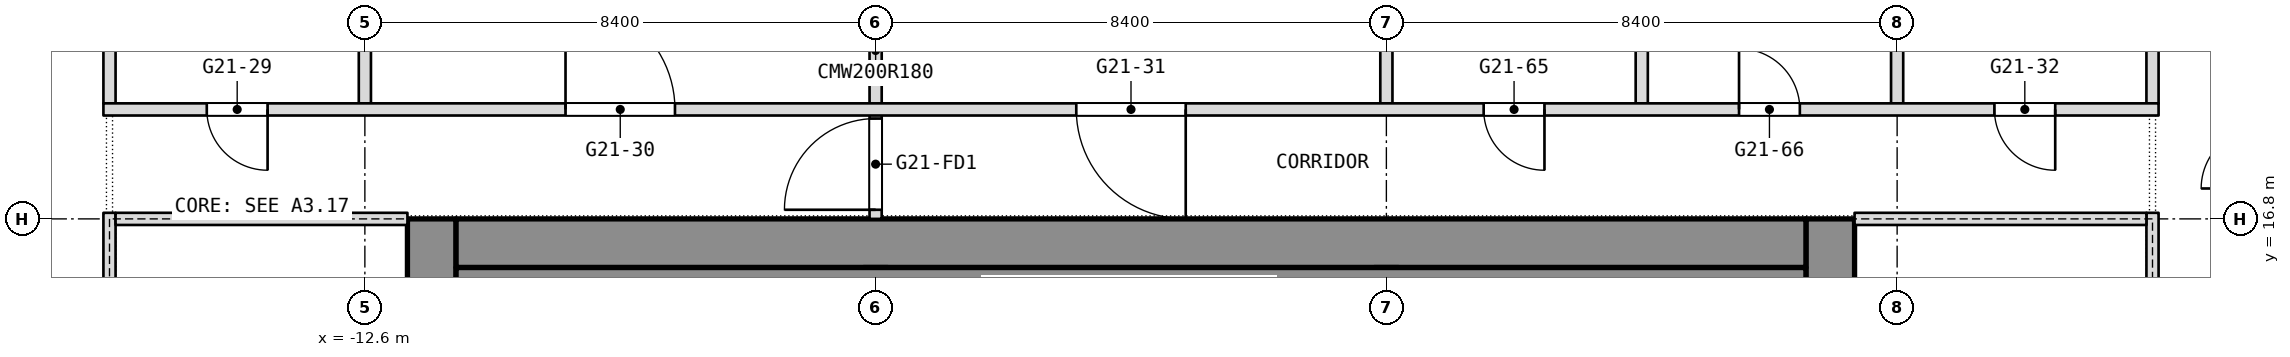
"""IFC4 building model, lengths in metres.
Left out: names, types, materials, properties, quantities, classifications, styles, units other than length and angle.
Written with IfcOpenShell. Run it as: python <this file> out.ifc"""

import sys

from ifc_helpers import new_model, si_unit, direction, frame, frame_2d, origin, place, context, subcontext, project, spatial, rectangle, extrude, element, fill, save


model = new_model("IFC4")
c1 = context("Model", 3, precision=1e-05, world=origin(), true_north=direction((0.0, 1.0)))
c2 = subcontext(c1, "Body", "Model", "MODEL_VIEW")
j1 = project(units=[si_unit("LENGTHUNIT", "METRE"), si_unit("PLANEANGLEUNIT", "RADIAN")], contexts=[c1])
p1 = place(None, origin())
s1 = spatial("IfcSite", under=j1, at=p1, CompositionType="ELEMENT")
p2 = place(p1, origin())
s2 = spatial("IfcBuilding", under=s1, at=p2, CompositionType="ELEMENT")
p3 = place(p2, frame((0.0, 0.0, 241.7)))
s3 = spatial("IfcBuildingStorey", under=s2, at=p3, CompositionType="ELEMENT", Elevation=241.7)
p4 = place(p3, frame((11.5, 0.0, 0.0), z_axis=(0.0, 0.0, 1.0), x_axis=(0.0, 1.0, 0.0)))
e1 = element("IfcWall", 1, at=p4, inside=s3, PredefinedType="SHEAR", context=c2, shape_type="SweptSolid", body=[
    extrude(rectangle(XDim=16.8, YDim=0.8, at=frame_2d((8.4, 0.0))), origin(), (0.0, 0.0, 1.0), 3.6),
])
p5 = place(p4, frame((2.3, 0.0, 0.0)))
e2 = element("IfcOpeningElement", 2, at=p5, cuts=e1, PredefinedType="OPENING", context=c2, shape_type="SweptSolid", body=[
    extrude(rectangle(XDim=1.1, YDim=2.1, at=frame_2d((0.55, 1.05))), frame((0.0, 0.4, 0.0), z_axis=(0.0, -1.0, 0.0), x_axis=(1.0, 0.0, 0.0)), (0.0, 0.0, 1.0), 0.8),
])
p6 = place(p4, frame((4.85, 0.0, 0.0)))
e3 = element("IfcOpeningElement", 3, at=p6, cuts=e1, PredefinedType="OPENING", context=c2, shape_type="SweptSolid", body=[
    extrude(rectangle(XDim=1.1, YDim=2.1, at=frame_2d((0.55, 1.05))), frame((0.0, 0.4, 0.0), z_axis=(0.0, -1.0, 0.0), x_axis=(1.0, 0.0, 0.0)), (0.0, 0.0, 1.0), 0.8),
])
p7 = place(p4, frame((6.825, 0.0, 0.0)))
e4 = element("IfcOpeningElement", 4, at=p7, cuts=e1, PredefinedType="OPENING", context=c2, shape_type="SweptSolid", body=[
    extrude(rectangle(XDim=1.2, YDim=2.1, at=frame_2d((0.6, 1.05))), frame((0.0, 0.4, 0.0), z_axis=(0.0, -1.0, 0.0), x_axis=(1.0, 0.0, 0.0)), (0.0, 0.0, 1.0), 0.8),
])
p8 = place(p4, frame((13.4, 0.0, 0.0)))
e5 = element("IfcOpeningElement", 5, at=p8, cuts=e1, PredefinedType="OPENING", context=c2, shape_type="SweptSolid", body=[
    extrude(rectangle(XDim=1.1, YDim=2.1, at=frame_2d((0.55, 1.05))), frame((0.0, 0.4, 0.0), z_axis=(0.0, -1.0, 0.0), x_axis=(1.0, 0.0, 0.0)), (0.0, 0.0, 1.0), 0.8),
])
p9 = place(p4, frame((10.85, 0.0, 0.0)))
e6 = element("IfcOpeningElement", 6, at=p9, cuts=e1, PredefinedType="OPENING", context=c2, shape_type="SweptSolid", body=[
    extrude(rectangle(XDim=1.1, YDim=2.1, at=frame_2d((0.55, 1.05))), frame((0.0, 0.4, 0.0), z_axis=(0.0, -1.0, 0.0), x_axis=(1.0, 0.0, 0.0)), (0.0, 0.0, 1.0), 0.8),
])
p10 = place(p4, frame((8.775, 0.0, 0.0)))
e7 = element("IfcOpeningElement", 7, at=p10, cuts=e1, PredefinedType="OPENING", context=c2, shape_type="SweptSolid", body=[
    extrude(rectangle(XDim=1.2, YDim=2.1, at=frame_2d((0.6, 1.05))), frame((0.0, 0.4, 0.0), z_axis=(0.0, -1.0, 0.0), x_axis=(1.0, 0.0, 0.0)), (0.0, 0.0, 1.0), 0.8),
])
p11 = place(p3, frame((-11.5, 0.0, 0.0), z_axis=(0.0, 0.0, 1.0), x_axis=(0.0, 1.0, 0.0)))
e8 = element("IfcWall", 8, at=p11, inside=s3, PredefinedType="SHEAR", context=c2, shape_type="SweptSolid", body=[
    extrude(rectangle(XDim=16.8, YDim=0.8, at=frame_2d((8.4, 0.0))), origin(), (0.0, 0.0, 1.0), 3.6),
])
p12 = place(p11, frame((1.837, 0.0, 0.0)))
e9 = element("IfcOpeningElement", 9, at=p12, cuts=e8, PredefinedType="OPENING", context=c2, shape_type="SweptSolid", body=[
    extrude(rectangle(XDim=0.9, YDim=2.1, at=frame_2d((0.45, 1.05))), frame((0.0, 0.4, 0.0), z_axis=(0.0, -1.0, 0.0), x_axis=(1.0, 0.0, 0.0)), (0.0, 0.0, 1.0), 0.8),
])
p13 = place(p11, frame((4.462, 0.0, 0.0)))
e10 = element("IfcOpeningElement", 10, at=p13, cuts=e8, PredefinedType="OPENING", context=c2, shape_type="SweptSolid", body=[
    extrude(rectangle(XDim=0.9, YDim=2.1, at=frame_2d((0.45, 1.05))), frame((0.0, 0.4, 0.0), z_axis=(0.0, -1.0, 0.0), x_axis=(1.0, 0.0, 0.0)), (0.0, 0.0, 1.0), 0.8),
])
p14 = place(p11, frame((6.825, 0.0, 0.0)))
e11 = element("IfcOpeningElement", 11, at=p14, cuts=e8, PredefinedType="OPENING", context=c2, shape_type="SweptSolid", body=[
    extrude(rectangle(XDim=1.2, YDim=2.1, at=frame_2d((0.6, 1.05))), frame((0.0, 0.4, 0.0), z_axis=(0.0, -1.0, 0.0), x_axis=(1.0, 0.0, 0.0)), (0.0, 0.0, 1.0), 0.8),
])
p15 = place(p11, frame((12.3, 0.0, 0.0)))
e12 = element("IfcOpeningElement", 12, at=p15, cuts=e8, PredefinedType="OPENING", context=c2, shape_type="SweptSolid", body=[
    extrude(rectangle(XDim=0.9, YDim=2.1, at=frame_2d((0.45, 1.05))), frame((0.0, 0.4, 0.0), z_axis=(0.0, -1.0, 0.0), x_axis=(1.0, 0.0, 0.0)), (0.0, 0.0, 1.0), 0.8),
])
p16 = place(p11, frame((8.775, 0.0, 0.0)))
e13 = element("IfcOpeningElement", 13, at=p16, cuts=e8, PredefinedType="OPENING", context=c2, shape_type="SweptSolid", body=[
    extrude(rectangle(XDim=1.2, YDim=2.1, at=frame_2d((0.6, 1.05))), frame((0.0, 0.4, 0.0), z_axis=(0.0, -1.0, 0.0), x_axis=(1.0, 0.0, 0.0)), (0.0, 0.0, 1.0), 0.8),
])
p17 = place(p3, frame((-11.1, 16.4, 0.0), z_axis=(0.0, 0.0, 1.0), x_axis=(1.0, 0.0, 0.0)))
e14 = element("IfcWall", 14, at=p17, inside=s3, PredefinedType="SHEAR", context=c2, shape_type="SweptSolid", body=[
    extrude(rectangle(XDim=22.2, YDim=0.8, at=frame_2d((11.1, 0.0))), origin(), (0.0, 0.0, 1.0), 3.6),
])
p18 = place(p3, frame((-4.2, 0.8, 0.0), z_axis=(0.0, 0.0, 1.0), x_axis=(0.0, 1.0, 0.0)))
e15 = element("IfcWall", 15, at=p18, inside=s3, PredefinedType="SHEAR", context=c2, shape_type="SweptSolid", body=[
    extrude(rectangle(XDim=15.2, YDim=0.4, at=frame_2d((7.6, 0.0))), origin(), (0.0, 0.0, 1.0), 3.6),
])
p19 = place(p18, frame((8.5, 0.0, 0.0)))
e16 = element("IfcOpeningElement", 16, at=p19, cuts=e15, PredefinedType="OPENING", context=c2, shape_type="SweptSolid", body=[
    extrude(rectangle(XDim=1.2, YDim=2.1, at=frame_2d((0.6, 1.05))), frame((0.0, 0.2, 0.0), z_axis=(0.0, -1.0, 0.0), x_axis=(1.0, 0.0, 0.0)), (0.0, 0.0, 1.0), 0.4),
])
p20 = place(p3, frame((4.2, 0.8, 0.0), z_axis=(0.0, 0.0, 1.0), x_axis=(0.0, 1.0, 0.0)))
e17 = element("IfcWall", 17, at=p20, inside=s3, PredefinedType="SHEAR", context=c2, shape_type="SweptSolid", body=[
    extrude(rectangle(XDim=15.2, YDim=0.4, at=frame_2d((7.6, 0.0))), origin(), (0.0, 0.0, 1.0), 3.6),
])
p21 = place(p20, frame((5.95, 0.0, 0.0)))
e18 = element("IfcOpeningElement", 18, at=p21, cuts=e17, PredefinedType="OPENING", context=c2, shape_type="SweptSolid", body=[
    extrude(rectangle(XDim=1.2, YDim=2.1, at=frame_2d((0.6, 1.05))), frame((0.0, 0.2, 0.0), z_axis=(0.0, -1.0, 0.0), x_axis=(1.0, 0.0, 0.0)), (0.0, 0.0, 1.0), 0.4),
])
for number, where, z_axis, x_axis in (
    (19, (16.8, 18.7, 0.0), (0.0, 0.0, 1.0), (0.0, 1.0, 0.0)),
    (20, (12.6, 18.7, 0.0), (0.0, 0.0, 1.0), (0.0, 1.0, 0.0)),
    (21, (8.4, 18.7, 0.0), (0.0, 0.0, 1.0), (0.0, 1.0, 0.0)),
    (22, (4.2, 18.7, 0.0), (0.0, 0.0, 1.0), (0.0, 1.0, 0.0)),
):
    element("IfcWall", number, at=place(p3, frame(where, z_axis=z_axis, x_axis=x_axis)), inside=s3, PredefinedType="PARTITIONING", context=c2, shape_type="SweptSolid", body=[
        extrude(rectangle(XDim=3.64, YDim=0.2, at=frame_2d((1.82, 0.0))), origin(), (0.0, 0.0, 1.0), 3.34),
    ])
p22 = place(p3, frame((-4.2, 16.8, 0.0), z_axis=(0.0, 0.0, 1.0), x_axis=(0.0, 1.0, 0.0)))
e23 = element("IfcWall", 23, at=p22, inside=s3, PredefinedType="PARTITIONING", context=c2, shape_type="SweptSolid", body=[
    extrude(rectangle(XDim=5.54, YDim=0.2, at=frame_2d((2.77, 0.0))), origin(), (0.0, 0.0, 1.0), 3.34),
])
p23 = place(p22, frame((0.15, 0.0, 0.0)))
e24 = element("IfcOpeningElement", 24, at=p23, cuts=e23, PredefinedType="OPENING", context=c2, shape_type="SweptSolid", body=[
    extrude(rectangle(XDim=1.5, YDim=2.1, at=frame_2d((0.75, 1.05))), frame((0.0, 0.1, 0.0), z_axis=(0.0, -1.0, 0.0), x_axis=(1.0, 0.0, 0.0)), (0.0, 0.0, 1.0), 0.2),
])
for number, where, z_axis, x_axis in (
    (25, (-12.6, 18.7, 0.0), (0.0, 0.0, 1.0), (0.0, 1.0, 0.0)),
    (26, (-16.8, 18.7, 0.0), (0.0, 0.0, 1.0), (0.0, 1.0, 0.0)),
):
    element("IfcWall", number, at=place(p3, frame(where, z_axis=z_axis, x_axis=x_axis)), inside=s3, PredefinedType="PARTITIONING", context=c2, shape_type="SweptSolid", body=[
        extrude(rectangle(XDim=3.64, YDim=0.2, at=frame_2d((1.82, 0.0))), origin(), (0.0, 0.0, 1.0), 3.34),
    ])
p24 = place(p3, frame((-16.9, 18.6, 0.0), z_axis=(0.0, 0.0, 1.0), x_axis=(1.0, 0.0, 0.0)))
e27 = element("IfcWall", 27, at=p24, inside=s3, PredefinedType="PARTITIONING", context=c2, shape_type="SweptSolid", body=[
    extrude(rectangle(XDim=33.8, YDim=0.2, at=frame_2d((16.9, 0.0))), origin(), (0.0, 0.0, 1.0), 3.34),
])
p25 = place(p24, frame((1.7, 0.0, 0.0)))
e28 = element("IfcOpeningElement", 28, at=p25, cuts=e27, PredefinedType="OPENING", context=c2, shape_type="SweptSolid", body=[
    extrude(rectangle(XDim=1.0, YDim=2.1, at=frame_2d((0.5, 1.05))), frame((0.0, 0.1, 0.0), z_axis=(0.0, -1.0, 0.0), x_axis=(1.0, 0.0, 0.0)), (0.0, 0.0, 1.0), 0.2),
])
p26 = place(p24, frame((7.6, 0.0, 0.0)))
e29 = element("IfcOpeningElement", 29, at=p26, cuts=e27, PredefinedType="OPENING", context=c2, shape_type="SweptSolid", body=[
    extrude(rectangle(XDim=1.8, YDim=2.1, at=frame_2d((0.9, 1.05))), frame((0.0, 0.1, 0.0), z_axis=(0.0, -1.0, 0.0), x_axis=(1.0, 0.0, 0.0)), (0.0, 0.0, 1.0), 0.2),
])
p27 = place(p24, frame((16.0, 0.0, 0.0)))
e30 = element("IfcOpeningElement", 30, at=p27, cuts=e27, PredefinedType="OPENING", context=c2, shape_type="SweptSolid", body=[
    extrude(rectangle(XDim=1.8, YDim=2.1, at=frame_2d((0.9, 1.05))), frame((0.0, 0.1, 0.0), z_axis=(0.0, -1.0, 0.0), x_axis=(1.0, 0.0, 0.0)), (0.0, 0.0, 1.0), 0.2),
])
p28 = place(p24, frame((31.1, 0.0, 0.0)))
e31 = element("IfcOpeningElement", 31, at=p28, cuts=e27, PredefinedType="OPENING", context=c2, shape_type="SweptSolid", body=[
    extrude(rectangle(XDim=1.0, YDim=2.1, at=frame_2d((0.5, 1.05))), frame((0.0, 0.1, 0.0), z_axis=(0.0, -1.0, 0.0), x_axis=(1.0, 0.0, 0.0)), (0.0, 0.0, 1.0), 0.2),
])
p29 = place(p24, frame((22.7, 0.0, 0.0)))
e32 = element("IfcOpeningElement", 32, at=p29, cuts=e27, PredefinedType="OPENING", context=c2, shape_type="SweptSolid", body=[
    extrude(rectangle(XDim=1.0, YDim=2.1, at=frame_2d((0.5, 1.05))), frame((0.0, 0.1, 0.0), z_axis=(0.0, -1.0, 0.0), x_axis=(1.0, 0.0, 0.0)), (0.0, 0.0, 1.0), 0.2),
])
p30 = place(p24, frame((26.9, 0.0, 0.0)))
e33 = element("IfcOpeningElement", 33, at=p30, cuts=e27, PredefinedType="OPENING", context=c2, shape_type="SweptSolid", body=[
    extrude(rectangle(XDim=1.0, YDim=2.1, at=frame_2d((0.5, 1.05))), frame((0.0, 0.1, 0.0), z_axis=(0.0, -1.0, 0.0), x_axis=(1.0, 0.0, 0.0)), (0.0, 0.0, 1.0), 0.2),
])
p31 = place(p3, frame((-11.1, 15.65, 0.0), z_axis=(0.0, 0.0, 1.0), x_axis=(1.0, 0.0, 0.0)))
e34 = element("IfcWall", 34, at=p31, inside=s3, PredefinedType="PARTITIONING", context=c2, shape_type="SweptSolid", body=[
    extrude(rectangle(XDim=22.2, YDim=0.7, at=frame_2d((11.1, 0.0))), origin(), (0.0, 0.0, 1.0), 3.34),
])
p32 = place(p3, frame((-16.8, -0.1, 0.0), z_axis=(0.0, 0.0, 1.0), x_axis=(0.0, 1.0, 0.0)))
e35 = element("IfcWall", 35, at=p32, inside=s3, PredefinedType="PARTITIONING", context=c2, shape_type="SweptSolid", body=[
    extrude(rectangle(XDim=17.0, YDim=0.2, at=frame_2d((8.5, 0.0))), origin(), (0.0, 0.0, 1.0), 3.34),
])
p33 = place(p32, frame((2.2, 0.0, 0.0)))
e36 = element("IfcOpeningElement", 36, at=p33, cuts=e35, PredefinedType="OPENING", context=c2, shape_type="SweptSolid", body=[
    extrude(rectangle(XDim=1.8, YDim=2.1, at=frame_2d((0.9, 1.05))), frame((0.0, 0.1, 0.0), z_axis=(0.0, -1.0, 0.0), x_axis=(1.0, 0.0, 0.0)), (0.0, 0.0, 1.0), 0.2),
])
p34 = place(p32, frame((13.0, 0.0, 0.0)))
e37 = element("IfcOpeningElement", 37, at=p34, cuts=e35, PredefinedType="OPENING", context=c2, shape_type="SweptSolid", body=[
    extrude(rectangle(XDim=1.8, YDim=2.1, at=frame_2d((0.9, 1.05))), frame((0.0, 0.1, 0.0), z_axis=(0.0, -1.0, 0.0), x_axis=(1.0, 0.0, 0.0)), (0.0, 0.0, 1.0), 0.2),
])
p35 = place(p3, frame((-16.7, 16.8, 0.0), z_axis=(0.0, 0.0, 1.0), x_axis=(1.0, 0.0, 0.0)))
e38 = element("IfcWall", 38, at=p35, inside=s3, PredefinedType="PARTITIONING", context=c2, shape_type="SweptSolid", body=[
    extrude(rectangle(XDim=4.8, YDim=0.2, at=frame_2d((2.4, 0.0))), origin(), (0.0, 0.0, 1.0), 2.94),
])
p36 = place(p3, frame((16.8, -0.1, 0.0), z_axis=(0.0, 0.0, 1.0), x_axis=(0.0, 1.0, 0.0)))
e39 = element("IfcWall", 39, at=p36, inside=s3, PredefinedType="PARTITIONING", context=c2, shape_type="SweptSolid", body=[
    extrude(rectangle(XDim=17.0, YDim=0.2, at=frame_2d((8.5, 0.0))), origin(), (0.0, 0.0, 1.0), 3.34),
])
p37 = place(p36, frame((2.2, 0.0, 0.0)))
e40 = element("IfcOpeningElement", 40, at=p37, cuts=e39, PredefinedType="OPENING", context=c2, shape_type="SweptSolid", body=[
    extrude(rectangle(XDim=1.8, YDim=2.1, at=frame_2d((0.9, 1.05))), frame((0.0, 0.1, 0.0), z_axis=(0.0, -1.0, 0.0), x_axis=(1.0, 0.0, 0.0)), (0.0, 0.0, 1.0), 0.2),
])
p38 = place(p36, frame((13.0, 0.0, 0.0)))
e41 = element("IfcOpeningElement", 41, at=p38, cuts=e39, PredefinedType="OPENING", context=c2, shape_type="SweptSolid", body=[
    extrude(rectangle(XDim=1.8, YDim=2.1, at=frame_2d((0.9, 1.05))), frame((0.0, 0.1, 0.0), z_axis=(0.0, -1.0, 0.0), x_axis=(1.0, 0.0, 0.0)), (0.0, 0.0, 1.0), 0.2),
])
p39 = place(p3, frame((11.9, 16.8, 0.0), z_axis=(0.0, 0.0, 1.0), x_axis=(1.0, 0.0, 0.0)))
e42 = element("IfcWall", 42, at=p39, inside=s3, PredefinedType="PARTITIONING", context=c2, shape_type="SweptSolid", body=[
    extrude(rectangle(XDim=4.8, YDim=0.2, at=frame_2d((2.4, 0.0))), origin(), (0.0, 0.0, 1.0), 2.94),
])
p40 = place(p25, origin())
e43 = element("IfcDoor", 43, at=p40, inside=s3, OperationType="SINGLE_SWING_LEFT", PredefinedType="DOOR", context=c2, shape_type="SweptSolid", body=[
    extrude(rectangle(XDim=1.0, YDim=2.1, at=frame_2d((0.5, 1.05))), frame((0.0, 0.025, 0.0), z_axis=(0.0, -1.0, 0.0), x_axis=(1.0, 0.0, 0.0)), (0.0, 0.0, 1.0), 0.05),
])
fill(e28, e43)
p41 = place(p26, origin())
e44 = element("IfcDoor", 44, at=p41, inside=s3, OperationType="DOUBLE_DOOR_SINGLE_SWING", PredefinedType="DOOR", context=c2, shape_type="SweptSolid", body=[
    extrude(rectangle(XDim=1.8, YDim=2.1, at=frame_2d((0.9, 1.05))), frame((0.0, 0.025, 0.0), z_axis=(0.0, -1.0, 0.0), x_axis=(1.0, 0.0, 0.0)), (0.0, 0.0, 1.0), 0.05),
])
fill(e29, e44)
p42 = place(p27, origin())
e45 = element("IfcDoor", 45, at=p42, inside=s3, OperationType="DOUBLE_DOOR_SINGLE_SWING", PredefinedType="DOOR", context=c2, shape_type="SweptSolid", body=[
    extrude(rectangle(XDim=1.8, YDim=2.1, at=frame_2d((0.9, 1.05))), frame((0.0, 0.025, 0.0), z_axis=(0.0, -1.0, 0.0), x_axis=(1.0, 0.0, 0.0)), (0.0, 0.0, 1.0), 0.05),
])
fill(e30, e45)
p43 = place(p28, origin())
e46 = element("IfcDoor", 46, at=p43, inside=s3, OperationType="SINGLE_SWING_RIGHT", PredefinedType="DOOR", context=c2, shape_type="SweptSolid", body=[
    extrude(rectangle(XDim=1.0, YDim=2.1, at=frame_2d((0.5, 1.05))), frame((0.0, 0.025, 0.0), z_axis=(0.0, -1.0, 0.0), x_axis=(1.0, 0.0, 0.0)), (0.0, 0.0, 1.0), 0.05),
])
fill(e31, e46)
p44 = place(p29, origin())
e47 = element("IfcDoor", 47, at=p44, inside=s3, OperationType="SINGLE_SWING_LEFT", PredefinedType="DOOR", context=c2, shape_type="SweptSolid", body=[
    extrude(rectangle(XDim=1.0, YDim=2.1, at=frame_2d((0.5, 1.05))), frame((0.0, 0.025, 0.0), z_axis=(0.0, -1.0, 0.0), x_axis=(1.0, 0.0, 0.0)), (0.0, 0.0, 1.0), 0.05),
])
fill(e32, e47)
p45 = place(p30, origin())
e48 = element("IfcDoor", 48, at=p45, inside=s3, OperationType="SINGLE_SWING_RIGHT", PredefinedType="DOOR", context=c2, shape_type="SweptSolid", body=[
    extrude(rectangle(XDim=1.0, YDim=2.1, at=frame_2d((0.5, 1.05))), frame((0.0, 0.025, 0.0), z_axis=(0.0, -1.0, 0.0), x_axis=(1.0, 0.0, 0.0)), (0.0, 0.0, 1.0), 0.05),
])
fill(e33, e48)
p46 = place(p23, origin())
e49 = element("IfcDoor", 49, at=p46, inside=s3, OperationType="DOUBLE_DOOR_DOUBLE_SWING", PredefinedType="DOOR", context=c2, shape_type="SweptSolid", body=[
    extrude(rectangle(XDim=1.5, YDim=2.1, at=frame_2d((0.75, 1.05))), frame((0.0, 0.025, 0.0), z_axis=(0.0, -1.0, 0.0), x_axis=(1.0, 0.0, 0.0)), (0.0, 0.0, 1.0), 0.05),
])
fill(e24, e49)
save(model, sys.argv[1])
